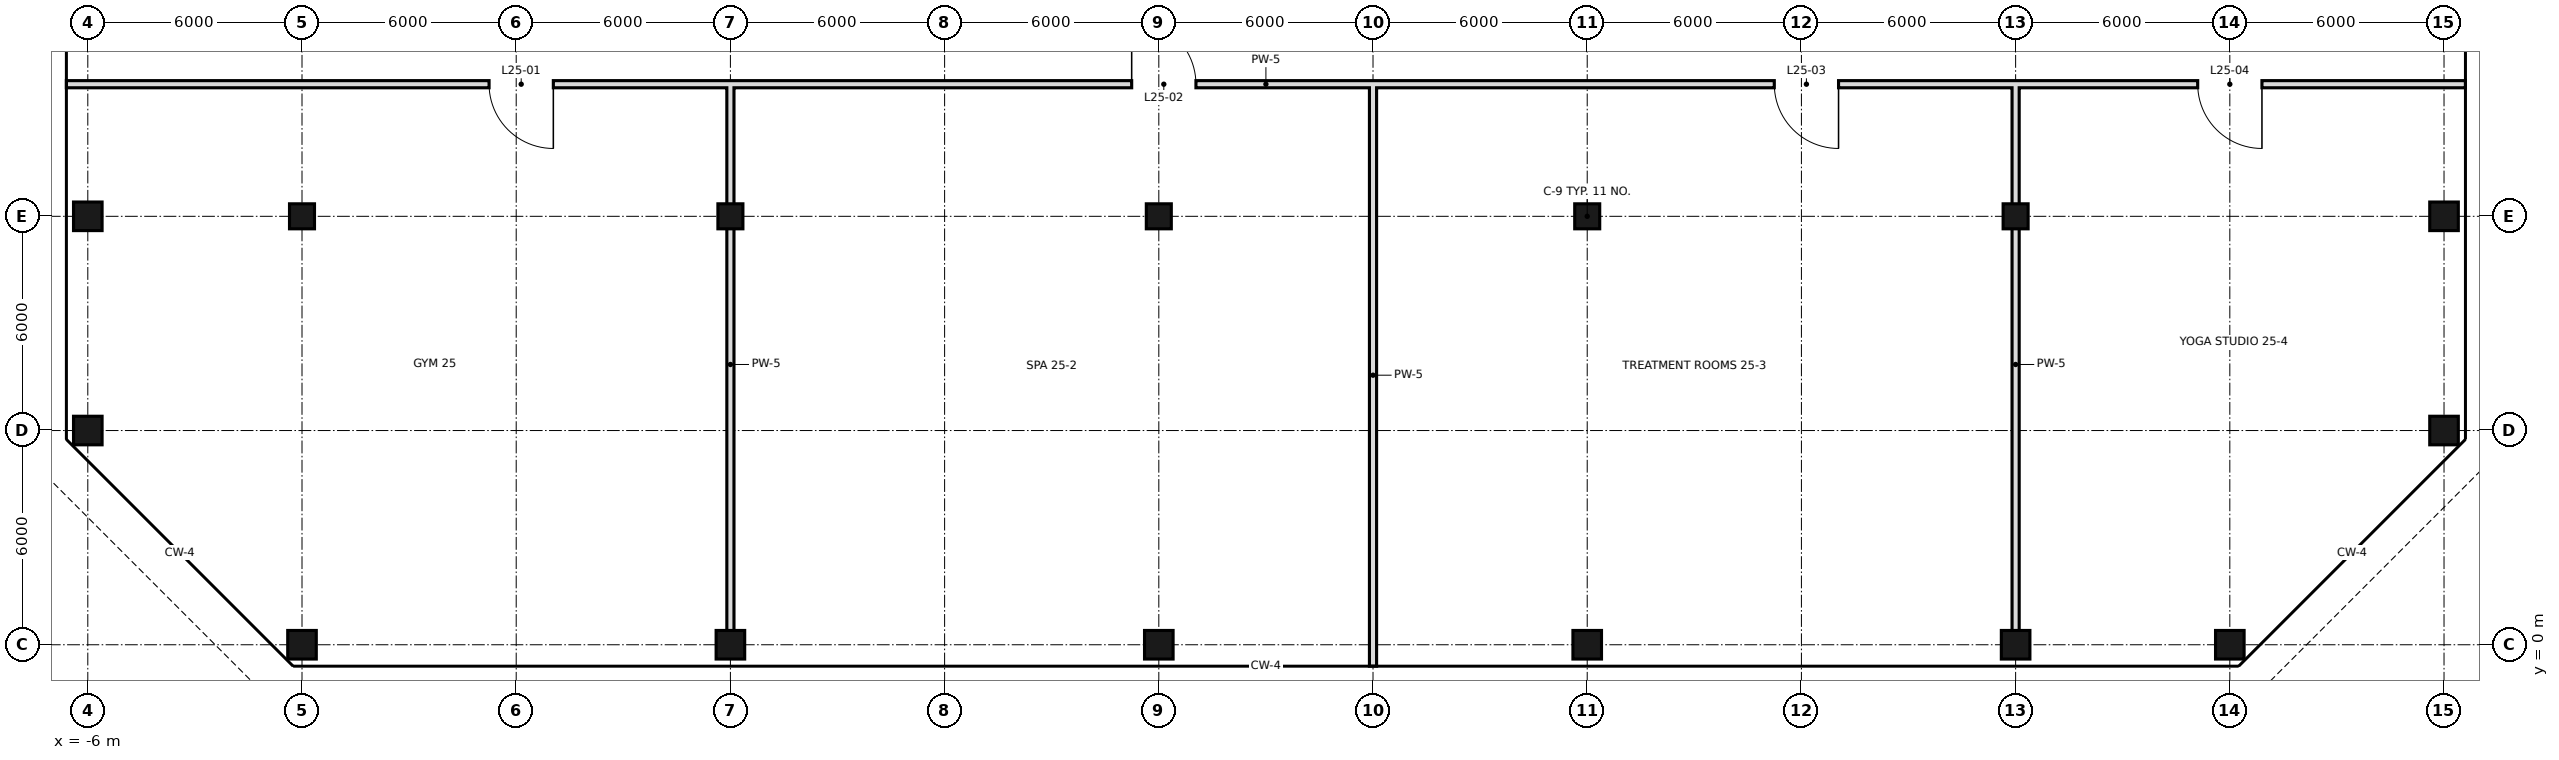
"""IFC4 building model, lengths in metres.
Left out: names, types, materials, properties, quantities, classifications, styles, units other than length and angle.
Written with IfcOpenShell. Run it as: python <this file> out.ifc"""

import sys

from ifc_helpers import new_model, si_unit, direction, frame, frame_2d, origin, origin_2d, place, context, subcontext, project, spatial, rectangle, hollow_rectangle, extrude, element, fill, save


model = new_model("IFC4")
c1 = context("Model", 3, precision=1e-05, world=origin(), true_north=direction((0.0, 1.0)))
c2 = subcontext(c1, "Body", "Model", "MODEL_VIEW")
j1 = project(units=[si_unit("LENGTHUNIT", "METRE"), si_unit("PLANEANGLEUNIT", "RADIAN")], contexts=[c1])
p1 = place(None, origin())
s1 = spatial("IfcSite", under=j1, at=p1, CompositionType="ELEMENT")
p2 = place(p1, origin())
s2 = spatial("IfcBuilding", under=s1, at=p2, CompositionType="ELEMENT")
p3 = place(p2, frame((0.0, 0.0, 114.2)))
s3 = spatial("IfcBuildingStorey", under=s2, at=p3, CompositionType="ELEMENT", Elevation=114.2)
for number, where, z_axis, x_axis in (
    (1, (-6.0, 6.0, 0.0), (0.0, 0.0, 1.0), (1.0, 0.0, 0.0)),
    (2, (-6.0, 12.0, 0.0), (0.0, 0.0, 1.0), (1.0, 0.0, 0.0)),
    (3, (0.0, 0.0, 0.0), (0.0, 0.0, 1.0), (1.0, 0.0, 0.0)),
):
    element("IfcColumn", number, at=place(p3, frame(where, z_axis=z_axis, x_axis=x_axis)), inside=s3, PredefinedType="COLUMN", context=c2, shape_type="SweptSolid", body=[
        extrude(hollow_rectangle(XDim=0.8, YDim=0.8, WallThickness=0.04, at=origin_2d()), origin(), (0.0, 0.0, 1.0), 5.4),
    ])
p4 = place(p3, frame((0.0, 12.0, 0.0), z_axis=(0.0, 0.0, 1.0), x_axis=(1.0, 0.0, 0.0)))
e4 = element("IfcColumn", 4, at=p4, inside=s3, PredefinedType="COLUMN", context=c2, shape_type="SweptSolid", body=[
    extrude(hollow_rectangle(XDim=0.7, YDim=0.7, WallThickness=0.036, at=origin_2d()), origin(), (0.0, 0.0, 1.0), 5.4),
])
p5 = place(p3, frame((12.0, 0.0, 0.0), z_axis=(0.0, 0.0, 1.0), x_axis=(1.0, 0.0, 0.0)))
e5 = element("IfcColumn", 5, at=p5, inside=s3, PredefinedType="COLUMN", context=c2, shape_type="SweptSolid", body=[
    extrude(hollow_rectangle(XDim=0.8, YDim=0.8, WallThickness=0.04, at=origin_2d()), origin(), (0.0, 0.0, 1.0), 5.4),
])
p6 = place(p3, frame((12.0, 12.0, 0.0), z_axis=(0.0, 0.0, 1.0), x_axis=(1.0, 0.0, 0.0)))
e6 = element("IfcColumn", 6, at=p6, inside=s3, PredefinedType="COLUMN", context=c2, shape_type="SweptSolid", body=[
    extrude(hollow_rectangle(XDim=0.7, YDim=0.7, WallThickness=0.036, at=origin_2d()), origin(), (0.0, 0.0, 1.0), 5.4),
])
p7 = place(p3, frame((24.0, 0.0, 0.0), z_axis=(0.0, 0.0, 1.0), x_axis=(1.0, 0.0, 0.0)))
e7 = element("IfcColumn", 7, at=p7, inside=s3, PredefinedType="COLUMN", context=c2, shape_type="SweptSolid", body=[
    extrude(hollow_rectangle(XDim=0.8, YDim=0.8, WallThickness=0.04, at=origin_2d()), origin(), (0.0, 0.0, 1.0), 5.4),
])
p8 = place(p3, frame((24.0, 12.0, 0.0), z_axis=(0.0, 0.0, 1.0), x_axis=(1.0, 0.0, 0.0)))
e8 = element("IfcColumn", 8, at=p8, inside=s3, PredefinedType="COLUMN", context=c2, shape_type="SweptSolid", body=[
    extrude(hollow_rectangle(XDim=0.7, YDim=0.7, WallThickness=0.036, at=origin_2d()), origin(), (0.0, 0.0, 1.0), 5.4),
])
p9 = place(p3, frame((36.0, 0.0, 0.0), z_axis=(0.0, 0.0, 1.0), x_axis=(1.0, 0.0, 0.0)))
e9 = element("IfcColumn", 9, at=p9, inside=s3, PredefinedType="COLUMN", context=c2, shape_type="SweptSolid", body=[
    extrude(hollow_rectangle(XDim=0.8, YDim=0.8, WallThickness=0.04, at=origin_2d()), origin(), (0.0, 0.0, 1.0), 5.4),
])
p10 = place(p3, frame((36.0, 12.0, 0.0), z_axis=(0.0, 0.0, 1.0), x_axis=(1.0, 0.0, 0.0)))
e10 = element("IfcColumn", 10, at=p10, inside=s3, PredefinedType="COLUMN", context=c2, shape_type="SweptSolid", body=[
    extrude(hollow_rectangle(XDim=0.7, YDim=0.7, WallThickness=0.036, at=origin_2d()), origin(), (0.0, 0.0, 1.0), 5.4),
])
p11 = place(p3, frame((48.0, 0.0, 0.0), z_axis=(0.0, 0.0, 1.0), x_axis=(1.0, 0.0, 0.0)))
e11 = element("IfcColumn", 11, at=p11, inside=s3, PredefinedType="COLUMN", context=c2, shape_type="SweptSolid", body=[
    extrude(hollow_rectangle(XDim=0.8, YDim=0.8, WallThickness=0.04, at=origin_2d()), origin(), (0.0, 0.0, 1.0), 5.4),
])
p12 = place(p3, frame((48.0, 12.0, 0.0), z_axis=(0.0, 0.0, 1.0), x_axis=(1.0, 0.0, 0.0)))
e12 = element("IfcColumn", 12, at=p12, inside=s3, PredefinedType="COLUMN", context=c2, shape_type="SweptSolid", body=[
    extrude(hollow_rectangle(XDim=0.7, YDim=0.7, WallThickness=0.036, at=origin_2d()), origin(), (0.0, 0.0, 1.0), 5.4),
])
for number, where, z_axis, x_axis in (
    (13, (54.0, 0.0, 0.0), (0.0, 0.0, 1.0), (1.0, 0.0, 0.0)),
    (14, (60.0, 6.0, 0.0), (0.0, 0.0, 1.0), (1.0, 0.0, 0.0)),
    (15, (60.0, 12.0, 0.0), (0.0, 0.0, 1.0), (1.0, 0.0, 0.0)),
):
    element("IfcColumn", number, at=place(p3, frame(where, z_axis=z_axis, x_axis=x_axis)), inside=s3, PredefinedType="COLUMN", context=c2, shape_type="SweptSolid", body=[
        extrude(hollow_rectangle(XDim=0.8, YDim=0.8, WallThickness=0.04, at=origin_2d()), origin(), (0.0, 0.0, 1.0), 5.4),
    ])
p13 = place(p3, frame((12.0, 0.0, 0.0), z_axis=(0.0, 0.0, 1.0), x_axis=(0.0, 1.0, 0.0)))
e16 = element("IfcWall", 16, at=p13, inside=s3, PredefinedType="SOLIDWALL", context=c2, shape_type="SweptSolid", body=[
    extrude(rectangle(XDim=15.7, YDim=0.2, at=frame_2d((7.85, 0.0))), origin(), (0.0, 0.0, 1.0), 4.52),
])
p14 = place(p3, frame((30.0, -0.6, 0.0), z_axis=(0.0, 0.0, 1.0), x_axis=(0.0, 1.0, 0.0)))
e17 = element("IfcWall", 17, at=p14, inside=s3, PredefinedType="SOLIDWALL", context=c2, shape_type="SweptSolid", body=[
    extrude(rectangle(XDim=16.3, YDim=0.2, at=frame_2d((8.15, 0.0))), origin(), (0.0, 0.0, 1.0), 4.52),
])
p15 = place(p3, frame((48.0, 0.0, 0.0), z_axis=(0.0, 0.0, 1.0), x_axis=(0.0, 1.0, 0.0)))
e18 = element("IfcWall", 18, at=p15, inside=s3, PredefinedType="SOLIDWALL", context=c2, shape_type="SweptSolid", body=[
    extrude(rectangle(XDim=15.7, YDim=0.2, at=frame_2d((7.85, 0.0))), origin(), (0.0, 0.0, 1.0), 4.52),
])
p16 = place(p3, frame((-6.6, 15.7, 0.0), z_axis=(0.0, 0.0, 1.0), x_axis=(1.0, 0.0, 0.0)))
e19 = element("IfcWall", 19, at=p16, inside=s3, PredefinedType="SOLIDWALL", context=c2, shape_type="SweptSolid", body=[
    extrude(rectangle(XDim=67.2, YDim=0.2, at=frame_2d((33.6, 0.0))), origin(), (0.0, 0.0, 1.0), 4.52),
])
p17 = place(p16, frame((11.84, 0.0, 0.0)))
e20 = element("IfcOpeningElement", 20, at=p17, cuts=e19, PredefinedType="OPENING", context=c2, shape_type="SweptSolid", body=[
    extrude(rectangle(XDim=1.8, YDim=2.4, at=frame_2d((0.9, 1.2))), frame((0.0, 0.11, 0.0), z_axis=(0.0, -1.0, 0.0), x_axis=(1.0, 0.0, 0.0)), (0.0, 0.0, 1.0), 0.22),
])
p18 = place(p16, frame((29.84, 0.0, 0.0)))
e21 = element("IfcOpeningElement", 21, at=p18, cuts=e19, PredefinedType="OPENING", context=c2, shape_type="SweptSolid", body=[
    extrude(rectangle(XDim=1.8, YDim=2.4, at=frame_2d((0.9, 1.2))), frame((0.0, 0.11, 0.0), z_axis=(0.0, -1.0, 0.0), x_axis=(1.0, 0.0, 0.0)), (0.0, 0.0, 1.0), 0.22),
])
p19 = place(p16, frame((47.84, 0.0, 0.0)))
e22 = element("IfcOpeningElement", 22, at=p19, cuts=e19, PredefinedType="OPENING", context=c2, shape_type="SweptSolid", body=[
    extrude(rectangle(XDim=1.8, YDim=2.4, at=frame_2d((0.9, 1.2))), frame((0.0, 0.11, 0.0), z_axis=(0.0, -1.0, 0.0), x_axis=(1.0, 0.0, 0.0)), (0.0, 0.0, 1.0), 0.22),
])
p20 = place(p16, frame((59.7, 0.0, 0.0)))
e23 = element("IfcOpeningElement", 23, at=p20, cuts=e19, PredefinedType="OPENING", context=c2, shape_type="SweptSolid", body=[
    extrude(rectangle(XDim=1.8, YDim=2.4, at=frame_2d((0.9, 1.2))), frame((0.0, 0.11, 0.0), z_axis=(0.0, -1.0, 0.0), x_axis=(1.0, 0.0, 0.0)), (0.0, 0.0, 1.0), 0.22),
])
p21 = place(p17, origin())
e24 = element("IfcDoor", 24, at=p21, inside=s3, OperationType="SINGLE_SWING_RIGHT", PredefinedType="DOOR", context=c2, shape_type="SweptSolid", body=[
    extrude(rectangle(XDim=1.8, YDim=2.4, at=frame_2d((0.9, 1.2))), frame((0.0, 0.025, 0.0), z_axis=(0.0, -1.0, 0.0), x_axis=(1.0, 0.0, 0.0)), (0.0, 0.0, 1.0), 0.05),
])
fill(e20, e24)
p22 = place(p18, origin())
e25 = element("IfcDoor", 25, at=p22, inside=s3, OperationType="SINGLE_SWING_LEFT", PredefinedType="DOOR", context=c2, shape_type="SweptSolid", body=[
    extrude(rectangle(XDim=1.8, YDim=2.4, at=frame_2d((0.9, 1.2))), frame((0.0, 0.025, 0.0), z_axis=(0.0, -1.0, 0.0), x_axis=(1.0, 0.0, 0.0)), (0.0, 0.0, 1.0), 0.05),
])
fill(e21, e25)
p23 = place(p19, origin())
e26 = element("IfcDoor", 26, at=p23, inside=s3, OperationType="SINGLE_SWING_RIGHT", PredefinedType="DOOR", context=c2, shape_type="SweptSolid", body=[
    extrude(rectangle(XDim=1.8, YDim=2.4, at=frame_2d((0.9, 1.2))), frame((0.0, 0.025, 0.0), z_axis=(0.0, -1.0, 0.0), x_axis=(1.0, 0.0, 0.0)), (0.0, 0.0, 1.0), 0.05),
])
fill(e22, e26)
p24 = place(p20, origin())
e27 = element("IfcDoor", 27, at=p24, inside=s3, OperationType="SINGLE_SWING_RIGHT", PredefinedType="DOOR", context=c2, shape_type="SweptSolid", body=[
    extrude(rectangle(XDim=1.8, YDim=2.4, at=frame_2d((0.9, 1.2))), frame((0.0, 0.025, 0.0), z_axis=(0.0, -1.0, 0.0), x_axis=(1.0, 0.0, 0.0)), (0.0, 0.0, 1.0), 0.05),
])
fill(e23, e27)
save(model, sys.argv[1])
